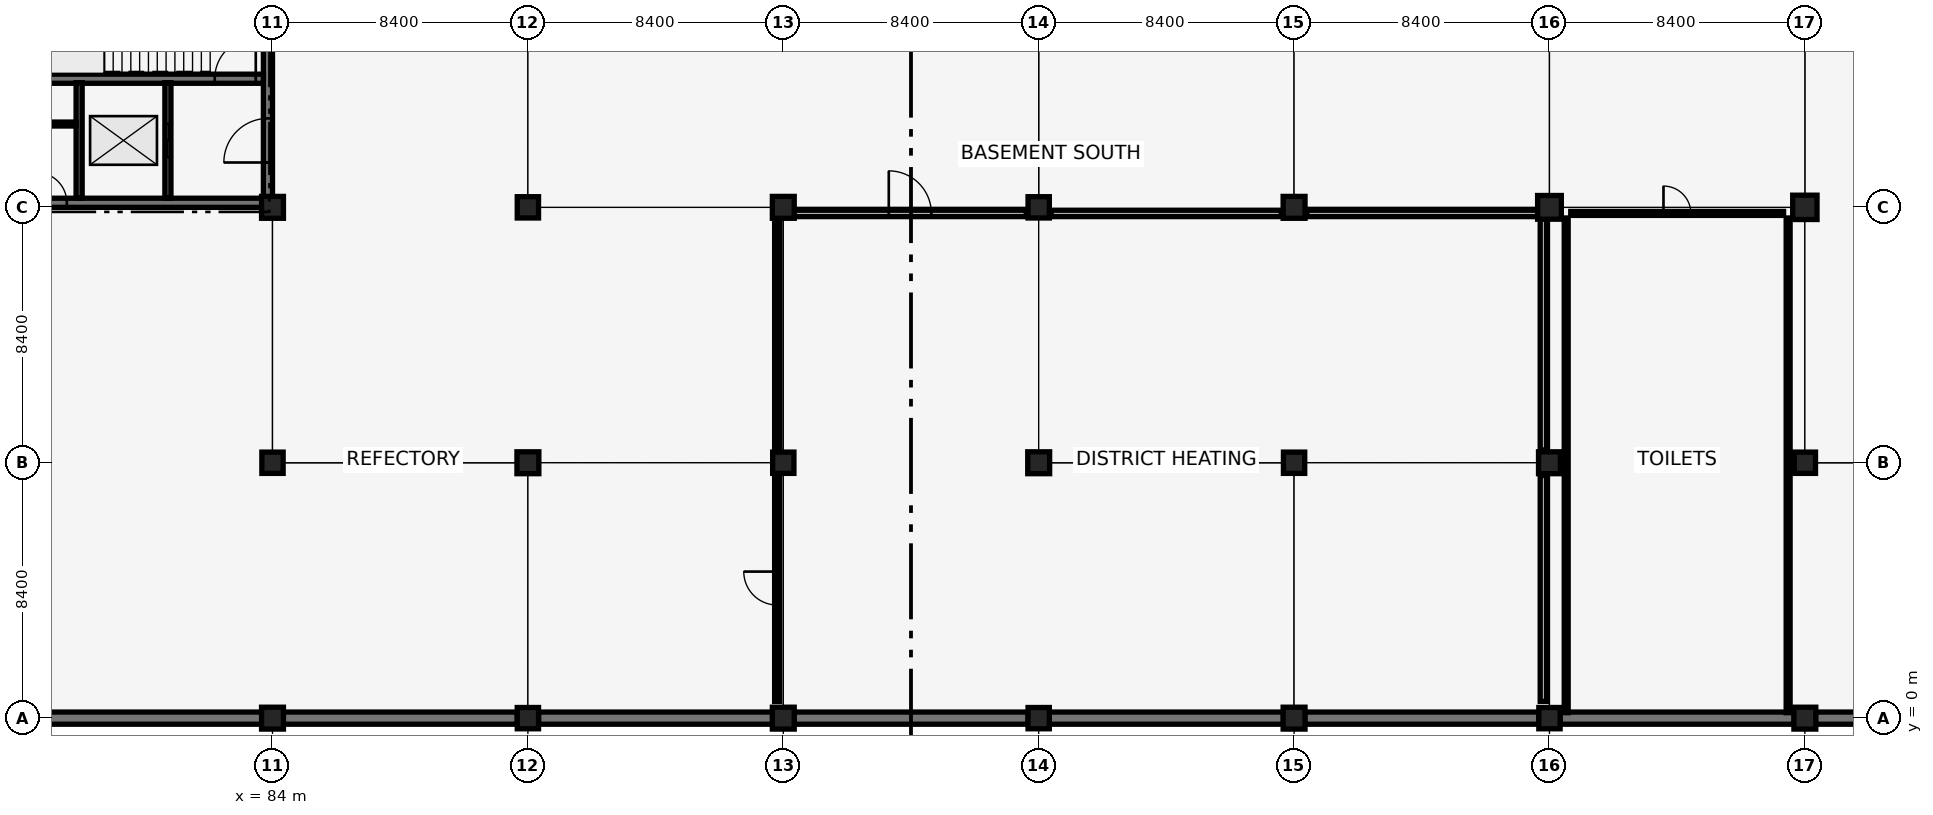
"""IFC4 building model, lengths in metres.
Left out: names, types, materials, properties, quantities, classifications, styles, units other than length and angle.
Written with IfcOpenShell. Run it as: python <this file> out.ifc"""

import sys

from ifc_helpers import new_model, si_unit, direction, frame, frame_2d, origin, origin_2d, place, context, subcontext, project, spatial, rectangle, extrude, element, fill, save


model = new_model("IFC4")
c1 = context("Model", 3, precision=1e-05, world=origin(), true_north=direction((0.0, 1.0)))
c2 = subcontext(c1, "Body", "Model", "MODEL_VIEW")
j1 = project(units=[si_unit("LENGTHUNIT", "METRE"), si_unit("PLANEANGLEUNIT", "RADIAN")], contexts=[c1])
p1 = place(None, origin())
s1 = spatial("IfcSite", under=j1, at=p1, CompositionType="ELEMENT")
p2 = place(p1, origin())
s2 = spatial("IfcBuilding", under=s1, at=p2, CompositionType="ELEMENT")
p3 = place(p2, frame((0.0, 0.0, -4.42)))
s3 = spatial("IfcBuildingStorey", under=s2, at=p3, CompositionType="ELEMENT", Elevation=-4.42)
for number, where, z_axis, x_axis in (
    (1, (75.95, 0.0, 0.0), (0.0, 0.0, 1.0), (1.0, 0.0, 0.0)),
    (2, (84.35, 0.0, 0.0), (0.0, 0.0, 1.0), (1.0, 0.0, 0.0)),
    (3, (92.75, 0.0, 0.0), (0.0, 0.0, 1.0), (1.0, 0.0, 0.0)),
):
    element("IfcWall", number, at=place(p3, frame(where, z_axis=z_axis, x_axis=x_axis)), inside=s3, PredefinedType="USERDEFINED", context=c2, shape_type="SweptSolid", body=[
        extrude(rectangle(XDim=7.7, YDim=0.4, at=frame_2d((3.85, 0.0))), origin(), (0.0, 0.0, 1.0), 4.12),
    ])
p4 = place(p3, frame((101.15, 0.0, 0.0), z_axis=(0.0, 0.0, 1.0), x_axis=(1.0, 0.0, 0.0)))
e4 = element("IfcWall", 4, at=p4, inside=s3, PredefinedType="USERDEFINED", context=c2, shape_type="SweptSolid", body=[
    extrude(rectangle(XDim=7.7, YDim=0.4, at=frame_2d((3.85, 0.0))), origin(), (0.0, 0.0, 1.0), 4.12),
])
for number, where, z_axis, x_axis in (
    (5, (109.55, 0.0, 0.0), (0.0, 0.0, 1.0), (1.0, 0.0, 0.0)),
    (6, (117.95, 0.0, 0.0), (0.0, 0.0, 1.0), (1.0, 0.0, 0.0)),
    (7, (126.35, 0.0, 0.0), (0.0, 0.0, 1.0), (1.0, 0.0, 0.0)),
    (8, (134.75, 0.0, 0.0), (0.0, 0.0, 1.0), (1.0, 0.0, 0.0)),
):
    element("IfcWall", number, at=place(p3, frame(where, z_axis=z_axis, x_axis=x_axis)), inside=s3, PredefinedType="USERDEFINED", context=c2, shape_type="SweptSolid", body=[
        extrude(rectangle(XDim=7.7, YDim=0.4, at=frame_2d((3.85, 0.0))), origin(), (0.0, 0.0, 1.0), 4.12),
    ])
p5 = place(p3, frame((75.75, 16.95, 0.0), z_axis=(0.0, 0.0, 1.0), x_axis=(1.0, 0.0, 0.0)))
e9 = element("IfcWall", 9, at=p5, inside=s3, PredefinedType="SHEAR", context=c2, shape_type="SweptSolid", body=[
    extrude(rectangle(XDim=8.1, YDim=0.3, at=frame_2d((4.05, 0.0))), origin(), (0.0, 0.0, 1.0), 4.12),
])
p6 = place(p5, frame((0.485, 0.0, 0.0)))
e10 = element("IfcOpeningElement", 10, at=p6, cuts=e9, PredefinedType="OPENING", context=c2, shape_type="SweptSolid", body=[
    extrude(rectangle(XDim=1.0, YDim=2.15, at=frame_2d((0.5, 1.075))), frame((0.0, 0.16, 0.0), z_axis=(0.0, -1.0, 0.0), x_axis=(1.0, 0.0, 0.0)), (0.0, 0.0, 1.0), 0.32),
])
p7 = place(p3, frame((83.85, 16.95, 0.0), z_axis=(0.0, 0.0, 1.0), x_axis=(0.0, 1.0, 0.0)))
e11 = element("IfcWall", 11, at=p7, inside=s3, PredefinedType="SHEAR", context=c2, shape_type="SweptSolid", body=[
    extrude(rectangle(XDim=8.1, YDim=0.3, at=frame_2d((4.05, 0.0))), origin(), (0.0, 0.0, 1.0), 4.12),
])
p8 = place(p7, frame((1.325, 0.0, 0.0)))
e12 = element("IfcOpeningElement", 12, at=p8, cuts=e11, PredefinedType="OPENING", context=c2, shape_type="SweptSolid", body=[
    extrude(rectangle(XDim=1.45, YDim=2.15, at=frame_2d((0.725, 1.075))), frame((0.0, 0.16, 0.0), z_axis=(0.0, -1.0, 0.0), x_axis=(1.0, 0.0, 0.0)), (0.0, 0.0, 1.0), 0.32),
])
p9 = place(p3, frame((75.9, 21.03, 0.0), z_axis=(0.0, 0.0, 1.0), x_axis=(1.0, 0.0, 0.0)))
e13 = element("IfcWall", 13, at=p9, inside=s3, PredefinedType="SHEAR", context=c2, shape_type="SweptSolid", body=[
    extrude(rectangle(XDim=7.8, YDim=0.3, at=frame_2d((3.9, 0.0))), origin(), (0.0, 0.0, 1.0), 4.12),
])
p10 = place(p9, frame((6.2, 0.0, 0.0)))
e14 = element("IfcOpeningElement", 14, at=p10, cuts=e13, PredefinedType="OPENING", context=c2, shape_type="SweptSolid", body=[
    extrude(rectangle(XDim=1.35, YDim=2.15, at=frame_2d((0.675, 1.075))), frame((0.0, 0.16, 0.0), z_axis=(0.0, -1.0, 0.0), x_axis=(1.0, 0.0, 0.0)), (0.0, 0.0, 1.0), 0.32),
])
p11 = place(p3, frame((84.0, 0.0, -0.4), z_axis=(0.0, 0.0, 1.0), x_axis=(1.0, 0.0, 0.0)))
e15 = element("IfcColumn", 15, at=p11, inside=s3, PredefinedType="COLUMN", context=c2, shape_type="SweptSolid", body=[
    extrude(rectangle(XDim=0.72, YDim=0.72, at=origin_2d()), origin(), (0.0, 0.0, 1.0), 4.52),
])
p12 = place(p3, frame((84.0, 8.4, -0.4), z_axis=(0.0, 0.0, 1.0), x_axis=(1.0, 0.0, 0.0)))
e16 = element("IfcColumn", 16, at=p12, inside=s3, PredefinedType="COLUMN", context=c2, shape_type="SweptSolid", body=[
    extrude(rectangle(XDim=0.7, YDim=0.7, at=origin_2d()), origin(), (0.0, 0.0, 1.0), 4.52),
])
p13 = place(p3, frame((84.0, 16.8, -0.4), z_axis=(0.0, 0.0, 1.0), x_axis=(1.0, 0.0, 0.0)))
e17 = element("IfcColumn", 17, at=p13, inside=s3, PredefinedType="COLUMN", context=c2, shape_type="SweptSolid", body=[
    extrude(rectangle(XDim=0.72, YDim=0.72, at=origin_2d()), origin(), (0.0, 0.0, 1.0), 4.52),
])
p14 = place(p3, frame((92.4, 0.0, -0.4), z_axis=(0.0, 0.0, 1.0), x_axis=(1.0, 0.0, 0.0)))
e18 = element("IfcColumn", 18, at=p14, inside=s3, PredefinedType="COLUMN", context=c2, shape_type="SweptSolid", body=[
    extrude(rectangle(XDim=0.7, YDim=0.7, at=origin_2d()), origin(), (0.0, 0.0, 1.0), 4.52),
])
p15 = place(p3, frame((92.4, 8.4, -0.4), z_axis=(0.0, 0.0, 1.0), x_axis=(1.0, 0.0, 0.0)))
e19 = element("IfcColumn", 19, at=p15, inside=s3, PredefinedType="COLUMN", context=c2, shape_type="SweptSolid", body=[
    extrude(rectangle(XDim=0.72, YDim=0.72, at=origin_2d()), origin(), (0.0, 0.0, 1.0), 4.52),
])
p16 = place(p3, frame((92.4, 16.8, -0.4), z_axis=(0.0, 0.0, 1.0), x_axis=(1.0, 0.0, 0.0)))
e20 = element("IfcColumn", 20, at=p16, inside=s3, PredefinedType="COLUMN", context=c2, shape_type="SweptSolid", body=[
    extrude(rectangle(XDim=0.7, YDim=0.7, at=origin_2d()), origin(), (0.0, 0.0, 1.0), 4.52),
])
p17 = place(p3, frame((100.8, 0.0, -0.4), z_axis=(0.0, 0.0, 1.0), x_axis=(1.0, 0.0, 0.0)))
e21 = element("IfcColumn", 21, at=p17, inside=s3, PredefinedType="COLUMN", context=c2, shape_type="SweptSolid", body=[
    extrude(rectangle(XDim=0.72, YDim=0.72, at=origin_2d()), origin(), (0.0, 0.0, 1.0), 4.52),
])
p18 = place(p3, frame((100.8, 8.4, -0.4), z_axis=(0.0, 0.0, 1.0), x_axis=(1.0, 0.0, 0.0)))
e22 = element("IfcColumn", 22, at=p18, inside=s3, PredefinedType="COLUMN", context=c2, shape_type="SweptSolid", body=[
    extrude(rectangle(XDim=0.7, YDim=0.7, at=origin_2d()), origin(), (0.0, 0.0, 1.0), 4.52),
])
p19 = place(p3, frame((100.8, 16.8, -0.4), z_axis=(0.0, 0.0, 1.0), x_axis=(1.0, 0.0, 0.0)))
e23 = element("IfcColumn", 23, at=p19, inside=s3, PredefinedType="COLUMN", context=c2, shape_type="SweptSolid", body=[
    extrude(rectangle(XDim=0.72, YDim=0.72, at=origin_2d()), origin(), (0.0, 0.0, 1.0), 4.52),
])
p20 = place(p3, frame((109.2, 0.0, -0.4), z_axis=(0.0, 0.0, 1.0), x_axis=(1.0, 0.0, 0.0)))
e24 = element("IfcColumn", 24, at=p20, inside=s3, PredefinedType="COLUMN", context=c2, shape_type="SweptSolid", body=[
    extrude(rectangle(XDim=0.7, YDim=0.7, at=origin_2d()), origin(), (0.0, 0.0, 1.0), 4.52),
])
p21 = place(p3, frame((109.2, 8.4, -0.4), z_axis=(0.0, 0.0, 1.0), x_axis=(1.0, 0.0, 0.0)))
e25 = element("IfcColumn", 25, at=p21, inside=s3, PredefinedType="COLUMN", context=c2, shape_type="SweptSolid", body=[
    extrude(rectangle(XDim=0.72, YDim=0.72, at=origin_2d()), origin(), (0.0, 0.0, 1.0), 4.52),
])
p22 = place(p3, frame((109.2, 16.8, -0.4), z_axis=(0.0, 0.0, 1.0), x_axis=(1.0, 0.0, 0.0)))
e26 = element("IfcColumn", 26, at=p22, inside=s3, PredefinedType="COLUMN", context=c2, shape_type="SweptSolid", body=[
    extrude(rectangle(XDim=0.7, YDim=0.7, at=origin_2d()), origin(), (0.0, 0.0, 1.0), 4.52),
])
p23 = place(p3, frame((117.6, 0.0, -0.4), z_axis=(0.0, 0.0, 1.0), x_axis=(1.0, 0.0, 0.0)))
e27 = element("IfcColumn", 27, at=p23, inside=s3, PredefinedType="COLUMN", context=c2, shape_type="SweptSolid", body=[
    extrude(rectangle(XDim=0.72, YDim=0.72, at=origin_2d()), origin(), (0.0, 0.0, 1.0), 4.52),
])
p24 = place(p3, frame((117.6, 8.4, -0.4), z_axis=(0.0, 0.0, 1.0), x_axis=(1.0, 0.0, 0.0)))
e28 = element("IfcColumn", 28, at=p24, inside=s3, PredefinedType="COLUMN", context=c2, shape_type="SweptSolid", body=[
    extrude(rectangle(XDim=0.7, YDim=0.7, at=origin_2d()), origin(), (0.0, 0.0, 1.0), 4.52),
])
p25 = place(p3, frame((117.6, 16.8, -0.4), z_axis=(0.0, 0.0, 1.0), x_axis=(1.0, 0.0, 0.0)))
e29 = element("IfcColumn", 29, at=p25, inside=s3, PredefinedType="COLUMN", context=c2, shape_type="SweptSolid", body=[
    extrude(rectangle(XDim=0.72, YDim=0.72, at=origin_2d()), origin(), (0.0, 0.0, 1.0), 4.52),
])
p26 = place(p3, frame((126.0, 0.0, -0.4), z_axis=(0.0, 0.0, 1.0), x_axis=(1.0, 0.0, 0.0)))
e30 = element("IfcColumn", 30, at=p26, inside=s3, PredefinedType="COLUMN", context=c2, shape_type="SweptSolid", body=[
    extrude(rectangle(XDim=0.7, YDim=0.7, at=origin_2d()), origin(), (0.0, 0.0, 1.0), 4.52),
])
p27 = place(p3, frame((126.0, 8.4, -0.4), z_axis=(0.0, 0.0, 1.0), x_axis=(1.0, 0.0, 0.0)))
e31 = element("IfcColumn", 31, at=p27, inside=s3, PredefinedType="COLUMN", context=c2, shape_type="SweptSolid", body=[
    extrude(rectangle(XDim=0.72, YDim=0.72, at=origin_2d()), origin(), (0.0, 0.0, 1.0), 4.52),
])
p28 = place(p3, frame((126.0, 16.8, -0.4), z_axis=(0.0, 0.0, 1.0), x_axis=(1.0, 0.0, 0.0)))
e32 = element("IfcColumn", 32, at=p28, inside=s3, PredefinedType="COLUMN", context=c2, shape_type="SweptSolid", body=[
    extrude(rectangle(XDim=0.78, YDim=0.78, at=origin_2d()), origin(), (0.0, 0.0, 1.0), 4.52),
])
p29 = place(p3, frame((134.4, 0.0, -0.4), z_axis=(0.0, 0.0, 1.0), x_axis=(1.0, 0.0, 0.0)))
e33 = element("IfcColumn", 33, at=p29, inside=s3, PredefinedType="COLUMN", context=c2, shape_type="SweptSolid", body=[
    extrude(rectangle(XDim=0.72, YDim=0.72, at=origin_2d()), origin(), (0.0, 0.0, 1.0), 4.52),
])
p30 = place(p3, frame((134.4, 8.4, -0.4), z_axis=(0.0, 0.0, 1.0), x_axis=(1.0, 0.0, 0.0)))
e34 = element("IfcColumn", 34, at=p30, inside=s3, PredefinedType="COLUMN", context=c2, shape_type="SweptSolid", body=[
    extrude(rectangle(XDim=0.7, YDim=0.7, at=origin_2d()), origin(), (0.0, 0.0, 1.0), 4.52),
])
p31 = place(p3, frame((134.4, 16.8, -0.4), z_axis=(0.0, 0.0, 1.0), x_axis=(1.0, 0.0, 0.0)))
e35 = element("IfcColumn", 35, at=p31, inside=s3, PredefinedType="COLUMN", context=c2, shape_type="SweptSolid", body=[
    extrude(rectangle(XDim=0.8, YDim=0.8, at=origin_2d()), origin(), (0.0, 0.0, 1.0), 4.52),
])
p32 = place(p3, frame((80.56, 17.1, 0.0), z_axis=(0.0, 0.0, 1.0), x_axis=(0.0, 1.0, 0.0)))
e36 = element("IfcWall", 36, at=p32, inside=s3, PredefinedType="SHEAR", context=c2, shape_type="SweptSolid", body=[
    extrude(rectangle(XDim=3.8, YDim=0.2, at=frame_2d((1.9, 0.0))), origin(), (0.0, 0.0, 1.0), 3.24),
])
p33 = place(p32, frame((1.35, 0.0, 0.0)))
e37 = element("IfcOpeningElement", 37, at=p33, cuts=e36, PredefinedType="OPENING", context=c2, shape_type="SweptSolid", body=[
    extrude(rectangle(XDim=1.1, YDim=2.15, at=frame_2d((0.55, 1.075))), frame((0.0, 0.11, 0.0), z_axis=(0.0, -1.0, 0.0), x_axis=(1.0, 0.0, 0.0)), (0.0, 0.0, 1.0), 0.22),
])
p34 = place(p3, frame((77.64, 17.1, 0.0), z_axis=(0.0, 0.0, 1.0), x_axis=(0.0, 1.0, 0.0)))
e38 = element("IfcWall", 38, at=p34, inside=s3, PredefinedType="SHEAR", context=c2, shape_type="SweptSolid", body=[
    extrude(rectangle(XDim=3.8, YDim=0.2, at=frame_2d((1.9, 0.0))), origin(), (0.0, 0.0, 1.0), 3.24),
])
p35 = place(p3, frame((75.92, 19.54, 0.0), z_axis=(0.0, 0.0, 1.0), x_axis=(1.0, 0.0, 0.0)))
e39 = element("IfcWall", 39, at=p35, inside=s3, PredefinedType="PARTITIONING", context=c2, shape_type="SweptSolid", body=[
    extrude(rectangle(XDim=1.62, YDim=0.13, at=frame_2d((0.81, 0.0))), origin(), (0.0, 0.0, 1.0), 4.12),
])
p36 = place(p3, frame((100.6, 0.55, 0.0), z_axis=(0.0, 0.0, 1.0), x_axis=(0.0, 1.0, 0.0)))
e40 = element("IfcWall", 40, at=p36, inside=s3, PredefinedType="PARTITIONING", context=c2, shape_type="SweptSolid", body=[
    extrude(rectangle(XDim=7.44, YDim=0.17, at=frame_2d((3.72, 0.0))), origin(), (0.0, 0.0, 1.0), 3.32),
])
p37 = place(p36, frame((3.17, 0.0, 0.0)))
e41 = element("IfcOpeningElement", 41, at=p37, cuts=e40, PredefinedType="OPENING", context=c2, shape_type="SweptSolid", body=[
    extrude(rectangle(XDim=1.1, YDim=2.15, at=frame_2d((0.55, 1.075))), frame((0.0, 0.095, 0.0), z_axis=(0.0, -1.0, 0.0), x_axis=(1.0, 0.0, 0.0)), (0.0, 0.0, 1.0), 0.19),
])
p38 = place(p3, frame((100.6, 8.81, 0.0), z_axis=(0.0, 0.0, 1.0), x_axis=(0.0, 1.0, 0.0)))
e42 = element("IfcWall", 42, at=p38, inside=s3, PredefinedType="PARTITIONING", context=c2, shape_type="SweptSolid", body=[
    extrude(rectangle(XDim=7.64, YDim=0.17, at=frame_2d((3.82, 0.0))), origin(), (0.0, 0.0, 1.0), 3.24),
])
p39 = place(p3, frame((101.15, 16.6, 0.0), z_axis=(0.0, 0.0, 1.0), x_axis=(1.0, 0.0, 0.0)))
e43 = element("IfcWall", 43, at=p39, inside=s3, PredefinedType="PARTITIONING", context=c2, shape_type="SweptSolid", body=[
    extrude(rectangle(XDim=7.64, YDim=0.21, at=frame_2d((3.82, 0.0))), origin(), (0.0, 0.0, 1.0), 3.24),
])
p40 = place(p39, frame((3.12, 0.0, 0.0)))
e44 = element("IfcOpeningElement", 44, at=p40, cuts=e43, PredefinedType="OPENING", context=c2, shape_type="SweptSolid", body=[
    extrude(rectangle(XDim=1.4, YDim=2.2, at=frame_2d((0.7, 1.1))), frame((0.0, 0.115, 0.0), z_axis=(0.0, -1.0, 0.0), x_axis=(1.0, 0.0, 0.0)), (0.0, 0.0, 1.0), 0.23),
])
p41 = place(p3, frame((109.61, 16.6, 0.0), z_axis=(0.0, 0.0, 1.0), x_axis=(1.0, 0.0, 0.0)))
e45 = element("IfcWall", 45, at=p41, inside=s3, PredefinedType="PARTITIONING", context=c2, shape_type="SweptSolid", body=[
    extrude(rectangle(XDim=7.57, YDim=0.21, at=frame_2d((3.785, 0.0))), origin(), (0.0, 0.0, 1.0), 3.24),
])
p42 = place(p3, frame((118.02, 16.6, 0.0), z_axis=(0.0, 0.0, 1.0), x_axis=(1.0, 0.0, 0.0)))
e46 = element("IfcWall", 46, at=p42, inside=s3, PredefinedType="PARTITIONING", context=c2, shape_type="SweptSolid", body=[
    extrude(rectangle(XDim=7.63, YDim=0.21, at=frame_2d((3.815, 0.0))), origin(), (0.0, 0.0, 1.0), 3.17),
])
p43 = place(p3, frame((125.8, 0.55, 0.0), z_axis=(0.0, 0.0, 1.0), x_axis=(0.0, 1.0, 0.0)))
e47 = element("IfcWall", 47, at=p43, inside=s3, PredefinedType="PARTITIONING", context=c2, shape_type="SweptSolid", body=[
    extrude(rectangle(XDim=7.43, YDim=0.21, at=frame_2d((3.715, 0.0))), origin(), (0.0, 0.0, 1.0), 3.57),
])
p44 = place(p3, frame((125.8, 8.82, 0.0), z_axis=(0.0, 0.0, 1.0), x_axis=(0.0, 1.0, 0.0)))
e48 = element("IfcWall", 48, at=p44, inside=s3, PredefinedType="PARTITIONING", context=c2, shape_type="SweptSolid", body=[
    extrude(rectangle(XDim=7.63, YDim=0.21, at=frame_2d((3.815, 0.0))), origin(), (0.0, 0.0, 1.0), 3.17),
])
p45 = place(p3, frame((126.7, 16.6, 0.0), z_axis=(0.0, 0.0, 1.0), x_axis=(1.0, 0.0, 0.0)))
e49 = element("IfcWall", 49, at=p45, inside=s3, PredefinedType="PARTITIONING", context=c2, shape_type="SweptSolid", body=[
    extrude(rectangle(XDim=7.0, YDim=0.13, at=frame_2d((3.5, 0.0))), origin(), (0.0, 0.0, 1.0), 3.17),
])
p46 = place(p45, frame((3.05, 0.0, 0.0)))
e50 = element("IfcOpeningElement", 50, at=p46, cuts=e49, PredefinedType="OPENING", context=c2, shape_type="SweptSolid", body=[
    extrude(rectangle(XDim=0.9, YDim=2.1, at=frame_2d((0.45, 1.05))), frame((0.0, 0.075, 0.0), z_axis=(0.0, -1.0, 0.0), x_axis=(1.0, 0.0, 0.0)), (0.0, 0.0, 1.0), 0.15),
])
for number, where, z_axis, x_axis in (
    (51, (133.85, 0.18, 0.0), (0.0, 0.0, 1.0), (0.0, 1.0, 0.0)),
    (52, (126.55, 0.18, 0.0), (0.0, 0.0, 1.0), (0.0, 1.0, 0.0)),
):
    element("IfcWall", number, at=place(p3, frame(where, z_axis=z_axis, x_axis=x_axis)), inside=s3, PredefinedType="PARTITIONING", context=c2, shape_type="SweptSolid", body=[
        extrude(rectangle(XDim=16.27, YDim=0.13, at=frame_2d((8.135, 0.0))), origin(), (0.0, 0.0, 1.0), 3.17),
    ])
p47 = place(p10, origin())
e53 = element("IfcDoor", 53, at=p47, inside=s3, OperationType="SINGLE_SWING_RIGHT", PredefinedType="DOOR", context=c2, shape_type="SweptSolid", body=[
    extrude(rectangle(XDim=1.35, YDim=2.15, at=frame_2d((0.675, 1.075))), frame((0.0, 0.025, 0.0), z_axis=(0.0, -1.0, 0.0), x_axis=(1.0, 0.0, 0.0)), (0.0, 0.0, 1.0), 0.05),
])
fill(e14, e53)
p48 = place(p33, origin())
e54 = element("IfcDoor", 54, at=p48, inside=s3, OperationType="SLIDING_TO_LEFT", PredefinedType="DOOR", context=c2, shape_type="SweptSolid", body=[
    extrude(rectangle(XDim=1.1, YDim=2.15, at=frame_2d((0.55, 1.075))), frame((0.0, 0.025, 0.0), z_axis=(0.0, -1.0, 0.0), x_axis=(1.0, 0.0, 0.0)), (0.0, 0.0, 1.0), 0.05),
])
fill(e37, e54)
p49 = place(p8, origin())
e55 = element("IfcDoor", 55, at=p49, inside=s3, OperationType="DOUBLE_DOOR_SINGLE_SWING", PredefinedType="DOOR", context=c2, shape_type="SweptSolid", body=[
    extrude(rectangle(XDim=1.45, YDim=2.15, at=frame_2d((0.725, 1.075))), frame((0.0, 0.025, 0.0), z_axis=(0.0, -1.0, 0.0), x_axis=(1.0, 0.0, 0.0)), (0.0, 0.0, 1.0), 0.05),
])
fill(e12, e55)
p50 = place(p6, origin())
e56 = element("IfcDoor", 56, at=p50, inside=s3, OperationType="SINGLE_SWING_LEFT", PredefinedType="DOOR", context=c2, shape_type="SweptSolid", body=[
    extrude(rectangle(XDim=1.0, YDim=2.15, at=frame_2d((0.5, 1.075))), frame((0.0, 0.025, 0.0), z_axis=(0.0, -1.0, 0.0), x_axis=(1.0, 0.0, 0.0)), (0.0, 0.0, 1.0), 0.05),
])
fill(e10, e56)
p51 = place(p37, origin())
e57 = element("IfcDoor", 57, at=p51, inside=s3, OperationType="SINGLE_SWING_RIGHT", PredefinedType="DOOR", context=c2, shape_type="SweptSolid", body=[
    extrude(rectangle(XDim=1.1, YDim=2.15, at=frame_2d((0.55, 1.075))), frame((0.0, 0.025, 0.0), z_axis=(0.0, -1.0, 0.0), x_axis=(1.0, 0.0, 0.0)), (0.0, 0.0, 1.0), 0.05),
])
fill(e41, e57)
p52 = place(p40, origin())
e58 = element("IfcDoor", 58, at=p52, inside=s3, OperationType="DOUBLE_DOOR_SINGLE_SWING", PredefinedType="DOOR", context=c2, shape_type="SweptSolid", body=[
    extrude(rectangle(XDim=1.4, YDim=2.2, at=frame_2d((0.7, 1.1))), frame((0.0, 0.025, 0.0), z_axis=(0.0, -1.0, 0.0), x_axis=(1.0, 0.0, 0.0)), (0.0, 0.0, 1.0), 0.05),
])
fill(e44, e58)
p53 = place(p46, origin())
e59 = element("IfcDoor", 59, at=p53, inside=s3, OperationType="SINGLE_SWING_LEFT", PredefinedType="DOOR", context=c2, shape_type="SweptSolid", body=[
    extrude(rectangle(XDim=0.9, YDim=2.1, at=frame_2d((0.45, 1.05))), frame((0.0, 0.025, 0.0), z_axis=(0.0, -1.0, 0.0), x_axis=(1.0, 0.0, 0.0)), (0.0, 0.0, 1.0), 0.05),
])
fill(e50, e59)
save(model, sys.argv[1])
